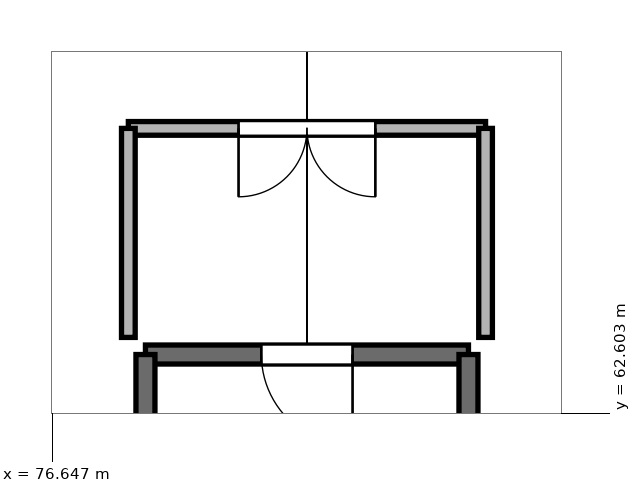
"""IFC4 building model, lengths in metres.
Left out: names, types, materials, properties, quantities, classifications, styles, units other than length and angle.
Written with IfcOpenShell. Run it as: python <this file> out.ifc"""

import sys

from ifc_helpers import new_model, si_unit, direction, frame, frame_2d, origin, place, context, subcontext, project, spatial, rectangle, extrude, element, fill, save


model = new_model("IFC4")
c1 = context("Model", 3, precision=1e-05, world=origin(), true_north=direction((0.0, 1.0)))
c2 = subcontext(c1, "Body", "Model", "MODEL_VIEW")
j1 = project(units=[si_unit("LENGTHUNIT", "METRE"), si_unit("PLANEANGLEUNIT", "RADIAN")], contexts=[c1])
p1 = place(None, origin())
s1 = spatial("IfcSite", under=j1, at=p1, CompositionType="ELEMENT")
p2 = place(p1, origin())
s2 = spatial("IfcBuilding", under=s1, at=p2, CompositionType="ELEMENT")
p3 = place(p2, frame((0.0, 0.0, 34.05)))
s3 = spatial("IfcBuildingStorey", under=s2, at=p3, CompositionType="ELEMENT", Elevation=34.05)
p4 = place(p3, frame((82.125, 63.375, 0.0), z_axis=(0.0, 0.0, 1.0), x_axis=(-1.0, 0.0, 0.0)))
e1 = element("IfcWall", 1, at=p4, inside=s3, PredefinedType="SHEAR", context=c2, shape_type="SweptSolid", body=[
    extrude(rectangle(XDim=4.25, YDim=0.25, at=frame_2d((2.125, 0.0))), origin(), (0.0, 0.0, 1.0), 3.0),
])
p5 = place(p4, frame((1.525, 0.0, 0.0)))
e2 = element("IfcOpeningElement", 2, at=p5, cuts=e1, PredefinedType="OPENING", context=c2, shape_type="SweptSolid", body=[
    extrude(rectangle(XDim=1.2, YDim=2.2, at=frame_2d((0.6, 1.1))), frame((0.0, 0.137, 0.0), z_axis=(0.0, -1.0, 0.0), x_axis=(1.0, 0.0, 0.0)), (0.0, 0.0, 1.0), 0.274),
])
for number, where, z_axis, x_axis in (
    (3, (77.875, 63.375, 0.0), (0.0, 0.0, 1.0), (0.0, -1.0, 0.0)),
    (4, (82.125, 56.175, 0.0), (0.0, 0.0, 1.0), (0.0, 1.0, 0.0)),
):
    element("IfcWall", number, at=place(p3, frame(where, z_axis=z_axis, x_axis=x_axis)), inside=s3, PredefinedType="SHEAR", context=c2, shape_type="SweptSolid", body=[
        extrude(rectangle(XDim=7.2, YDim=0.25, at=frame_2d((3.6, 0.0))), origin(), (0.0, 0.0, 1.0), 3.0),
    ])
p6 = place(p3, frame((77.65, 66.35, 0.0), z_axis=(0.0, 0.0, 1.0), x_axis=(1.0, 0.0, 0.0)))
e5 = element("IfcWall", 5, at=p6, inside=s3, PredefinedType="PARTITIONING", context=c2, shape_type="SweptSolid", body=[
    extrude(rectangle(XDim=4.7, YDim=0.18, at=frame_2d((2.35, 0.0))), origin(), (0.0, 0.0, 1.0), 2.53),
])
p7 = place(p6, frame((1.45, 0.0, 0.0)))
e6 = element("IfcOpeningElement", 6, at=p7, cuts=e5, PredefinedType="OPENING", context=c2, shape_type="SweptSolid", body=[
    extrude(rectangle(XDim=1.8, YDim=2.2, at=frame_2d((0.9, 1.1))), frame((0.0, 0.102, 0.0), z_axis=(0.0, -1.0, 0.0), x_axis=(1.0, 0.0, 0.0)), (0.0, 0.0, 1.0), 0.204),
])
for number, where, z_axis, x_axis in (
    (7, (77.65, 63.6, 0.0), (0.0, 0.0, 1.0), (0.0, 1.0, 0.0)),
    (8, (82.35, 63.6, 0.0), (0.0, 0.0, 1.0), (0.0, 1.0, 0.0)),
):
    element("IfcWall", number, at=place(p3, frame(where, z_axis=z_axis, x_axis=x_axis)), inside=s3, PredefinedType="PARTITIONING", context=c2, shape_type="SweptSolid", body=[
        extrude(rectangle(XDim=2.75, YDim=0.18, at=frame_2d((1.375, 0.0))), origin(), (0.0, 0.0, 1.0), 2.53),
    ])
p8 = place(p5, origin())
e9 = element("IfcDoor", 9, at=p8, inside=s3, OperationType="SINGLE_SWING_LEFT", PredefinedType="DOOR", context=c2, shape_type="SweptSolid", body=[
    extrude(rectangle(XDim=1.2, YDim=2.2, at=frame_2d((0.6, 1.1))), frame((0.0, 0.025, 0.0), z_axis=(0.0, -1.0, 0.0), x_axis=(1.0, 0.0, 0.0)), (0.0, 0.0, 1.0), 0.05),
])
fill(e2, e9)
p9 = place(p7, frame((1.8, 0.0, 0.0), z_axis=(0.0, 0.0, 1.0), x_axis=(-1.0, 0.0, 0.0)))
e10 = element("IfcDoor", 10, at=p9, inside=s3, OperationType="DOUBLE_DOOR_SINGLE_SWING", PredefinedType="DOOR", context=c2, shape_type="SweptSolid", body=[
    extrude(rectangle(XDim=1.8, YDim=2.2, at=frame_2d((0.9, 1.1))), frame((0.0, 0.025, 0.0), z_axis=(0.0, -1.0, 0.0), x_axis=(1.0, 0.0, 0.0)), (0.0, 0.0, 1.0), 0.05),
])
fill(e6, e10)
save(model, sys.argv[1])
